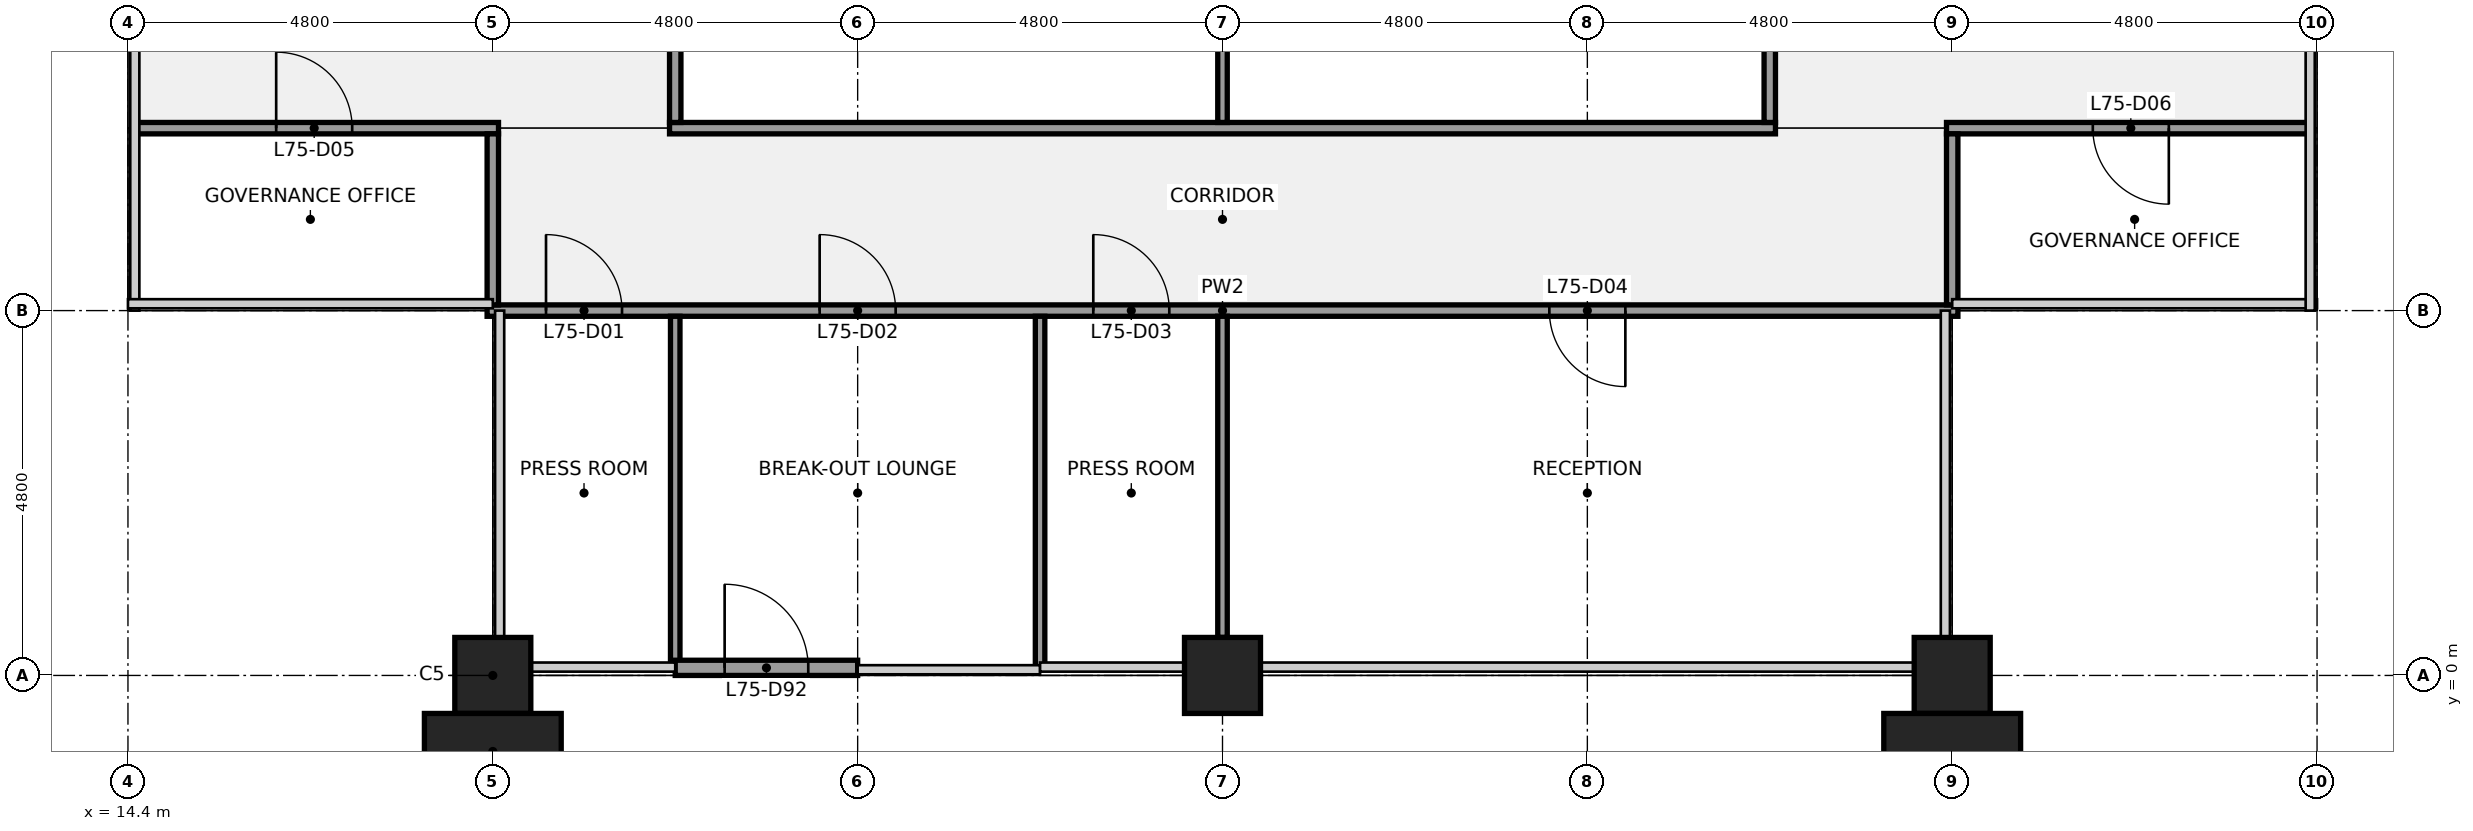
"""IFC4 building model, lengths in metres.
Left out: names, types, materials, properties, quantities, classifications, styles, units other than length and angle.
Written with IfcOpenShell. Run it as: python <this file> out.ifc"""

import sys

from ifc_helpers import new_model, si_unit, direction, frame, frame_2d, origin, origin_2d, place, context, subcontext, project, spatial, rectangle, extrude, element, fill, save


model = new_model("IFC4")
c1 = context("Model", 3, precision=1e-05, world=origin(), true_north=direction((0.0, 1.0)))
c2 = subcontext(c1, "Body", "Model", "MODEL_VIEW")
j1 = project(units=[si_unit("LENGTHUNIT", "METRE"), si_unit("PLANEANGLEUNIT", "RADIAN")], contexts=[c1])
p1 = place(None, origin())
s1 = spatial("IfcSite", under=j1, at=p1, CompositionType="ELEMENT")
p2 = place(p1, origin())
s2 = spatial("IfcBuilding", under=s1, at=p2, CompositionType="ELEMENT")
p3 = place(p2, frame((0.0, 0.0, 338.3)))
s3 = spatial("IfcBuildingStorey", under=s2, at=p3, CompositionType="ELEMENT", Elevation=338.3)
for number, where, z_axis, x_axis in (
    (1, (19.2, 0.0, 0.0), (0.0, 0.0, 1.0), (1.0, 0.0, 0.0)),
    (2, (28.8, 0.0, 0.0), (0.0, 0.0, 1.0), (1.0, 0.0, 0.0)),
    (3, (38.4, 0.0, 0.0), (0.0, 0.0, 1.0), (1.0, 0.0, 0.0)),
):
    element("IfcColumn", number, at=place(p3, frame(where, z_axis=z_axis, x_axis=x_axis)), inside=s3, PredefinedType="COLUMN", context=c2, shape_type="SweptSolid", body=[
        extrude(rectangle(XDim=1.0, YDim=1.0, at=origin_2d()), origin(), (0.0, 0.0, 1.0), 4.0),
    ])
p4 = place(p3, frame((19.125, 4.8, 0.0), z_axis=(0.0, 0.0, 1.0), x_axis=(1.0, 0.0, 0.0)))
e4 = element("IfcWall", 4, at=p4, inside=s3, PredefinedType="PARTITIONING", context=c2, shape_type="SweptSolid", body=[
    extrude(rectangle(XDim=19.35, YDim=0.15, at=frame_2d((9.675, 0.0))), origin(), (0.0, 0.0, 1.0), 2.87),
])
p5 = place(p4, frame((0.775, 0.0, 0.0)))
e5 = element("IfcOpeningElement", 5, at=p5, cuts=e4, PredefinedType="OPENING", context=c2, shape_type="SweptSolid", body=[
    extrude(rectangle(XDim=1.0, YDim=2.1, at=frame_2d((0.5, 1.05))), frame((0.0, 0.085, 0.0), z_axis=(0.0, -1.0, 0.0), x_axis=(1.0, 0.0, 0.0)), (0.0, 0.0, 1.0), 0.17),
])
p6 = place(p4, frame((4.375, 0.0, 0.0)))
e6 = element("IfcOpeningElement", 6, at=p6, cuts=e4, PredefinedType="OPENING", context=c2, shape_type="SweptSolid", body=[
    extrude(rectangle(XDim=1.0, YDim=2.1, at=frame_2d((0.5, 1.05))), frame((0.0, 0.085, 0.0), z_axis=(0.0, -1.0, 0.0), x_axis=(1.0, 0.0, 0.0)), (0.0, 0.0, 1.0), 0.17),
])
p7 = place(p4, frame((7.975, 0.0, 0.0)))
e7 = element("IfcOpeningElement", 7, at=p7, cuts=e4, PredefinedType="OPENING", context=c2, shape_type="SweptSolid", body=[
    extrude(rectangle(XDim=1.0, YDim=2.1, at=frame_2d((0.5, 1.05))), frame((0.0, 0.085, 0.0), z_axis=(0.0, -1.0, 0.0), x_axis=(1.0, 0.0, 0.0)), (0.0, 0.0, 1.0), 0.17),
])
p8 = place(p4, frame((13.975, 0.0, 0.0)))
e8 = element("IfcOpeningElement", 8, at=p8, cuts=e4, PredefinedType="OPENING", context=c2, shape_type="SweptSolid", body=[
    extrude(rectangle(XDim=1.0, YDim=2.1, at=frame_2d((0.5, 1.05))), frame((0.0, 0.085, 0.0), z_axis=(0.0, -1.0, 0.0), x_axis=(1.0, 0.0, 0.0)), (0.0, 0.0, 1.0), 0.17),
])
p9 = place(p3, frame((14.5, 7.2, 0.0), z_axis=(0.0, 0.0, 1.0), x_axis=(1.0, 0.0, 0.0)))
e9 = element("IfcWall", 9, at=p9, inside=s3, PredefinedType="PARTITIONING", context=c2, shape_type="SweptSolid", body=[
    extrude(rectangle(XDim=4.775, YDim=0.15, at=frame_2d((2.387, 0.0))), origin(), (0.0, 0.0, 1.0), 2.87),
])
p10 = place(p9, frame((1.85, 0.0, 0.0)))
e10 = element("IfcOpeningElement", 10, at=p10, cuts=e9, PredefinedType="OPENING", context=c2, shape_type="SweptSolid", body=[
    extrude(rectangle(XDim=1.0, YDim=2.1, at=frame_2d((0.5, 1.05))), frame((0.0, 0.085, 0.0), z_axis=(0.0, -1.0, 0.0), x_axis=(1.0, 0.0, 0.0)), (0.0, 0.0, 1.0), 0.17),
])
p11 = place(p3, frame((21.525, 7.2, 0.0), z_axis=(0.0, 0.0, 1.0), x_axis=(1.0, 0.0, 0.0)))
e11 = element("IfcWall", 11, at=p11, inside=s3, PredefinedType="PARTITIONING", context=c2, shape_type="SweptSolid", body=[
    extrude(rectangle(XDim=14.55, YDim=0.15, at=frame_2d((7.275, 0.0))), origin(), (0.0, 0.0, 1.0), 2.87),
])
p12 = place(p3, frame((38.325, 7.2, 0.0), z_axis=(0.0, 0.0, 1.0), x_axis=(1.0, 0.0, 0.0)))
e12 = element("IfcWall", 12, at=p12, inside=s3, PredefinedType="PARTITIONING", context=c2, shape_type="SweptSolid", body=[
    extrude(rectangle(XDim=4.775, YDim=0.15, at=frame_2d((2.388, 0.0))), origin(), (0.0, 0.0, 1.0), 2.87),
])
p13 = place(p12, frame((1.925, 0.0, 0.0)))
e13 = element("IfcOpeningElement", 13, at=p13, cuts=e12, PredefinedType="OPENING", context=c2, shape_type="SweptSolid", body=[
    extrude(rectangle(XDim=1.0, YDim=2.1, at=frame_2d((0.5, 1.05))), frame((0.0, 0.085, 0.0), z_axis=(0.0, -1.0, 0.0), x_axis=(1.0, 0.0, 0.0)), (0.0, 0.0, 1.0), 0.17),
])
p14 = place(p3, frame((19.2, 4.875, 0.0), z_axis=(0.0, 0.0, 1.0), x_axis=(0.0, 1.0, 0.0)))
e14 = element("IfcWall", 14, at=p14, inside=s3, PredefinedType="PARTITIONING", context=c2, shape_type="SweptSolid", body=[
    extrude(rectangle(XDim=2.25, YDim=0.15, at=frame_2d((1.125, 0.0))), origin(), (0.0, 0.0, 1.0), 2.87),
])
p15 = place(p3, frame((21.6, 0.1, 0.0), z_axis=(0.0, 0.0, 1.0), x_axis=(0.0, 1.0, 0.0)))
e15 = element("IfcWall", 15, at=p15, inside=s3, PredefinedType="PARTITIONING", context=c2, shape_type="SweptSolid", body=[
    extrude(rectangle(XDim=4.625, YDim=0.125, at=frame_2d((2.312, 0.0))), origin(), (0.0, 0.0, 1.0), 2.87),
])
p16 = place(p3, frame((21.6, 7.275, 0.0), z_axis=(0.0, 0.0, 1.0), x_axis=(0.0, 1.0, 0.0)))
e16 = element("IfcWall", 16, at=p16, inside=s3, PredefinedType="PARTITIONING", context=c2, shape_type="SweptSolid", body=[
    extrude(rectangle(XDim=7.062, YDim=0.15, at=frame_2d((3.531, 0.0))), origin(), (0.0, 0.0, 1.0), 2.87),
])
p17 = place(p16, frame((3.031, 0.0, 0.0)))
e17 = element("IfcOpeningElement", 17, at=p17, cuts=e16, PredefinedType="OPENING", context=c2, shape_type="SweptSolid", body=[
    extrude(rectangle(XDim=1.0, YDim=2.1, at=frame_2d((0.5, 1.05))), frame((0.0, 0.085, 0.0), z_axis=(0.0, -1.0, 0.0), x_axis=(1.0, 0.0, 0.0)), (0.0, 0.0, 1.0), 0.17),
])
p18 = place(p3, frame((26.4, 0.1, 0.0), z_axis=(0.0, 0.0, 1.0), x_axis=(0.0, 1.0, 0.0)))
e18 = element("IfcWall", 18, at=p18, inside=s3, PredefinedType="PARTITIONING", context=c2, shape_type="SweptSolid", body=[
    extrude(rectangle(XDim=4.625, YDim=0.125, at=frame_2d((2.312, 0.0))), origin(), (0.0, 0.0, 1.0), 2.87),
])
p19 = place(p3, frame((28.8, 0.5, 0.0), z_axis=(0.0, 0.0, 1.0), x_axis=(0.0, 1.0, 0.0)))
e19 = element("IfcWall", 19, at=p19, inside=s3, PredefinedType="PARTITIONING", context=c2, shape_type="SweptSolid", body=[
    extrude(rectangle(XDim=4.225, YDim=0.125, at=frame_2d((2.113, 0.0))), origin(), (0.0, 0.0, 1.0), 2.87),
])
p20 = place(p3, frame((28.8, 7.275, 0.0), z_axis=(0.0, 0.0, 1.0), x_axis=(0.0, 1.0, 0.0)))
e20 = element("IfcWall", 20, at=p20, inside=s3, PredefinedType="PARTITIONING", context=c2, shape_type="SweptSolid", body=[
    extrude(rectangle(XDim=7.062, YDim=0.125, at=frame_2d((3.531, 0.0))), origin(), (0.0, 0.0, 1.0), 2.87),
])
p21 = place(p3, frame((36.0, 7.275, 0.0), z_axis=(0.0, 0.0, 1.0), x_axis=(0.0, 1.0, 0.0)))
e21 = element("IfcWall", 21, at=p21, inside=s3, PredefinedType="PARTITIONING", context=c2, shape_type="SweptSolid", body=[
    extrude(rectangle(XDim=7.062, YDim=0.15, at=frame_2d((3.531, 0.0))), origin(), (0.0, 0.0, 1.0), 2.87),
])
p22 = place(p21, frame((3.031, 0.0, 0.0)))
e22 = element("IfcOpeningElement", 22, at=p22, cuts=e21, PredefinedType="OPENING", context=c2, shape_type="SweptSolid", body=[
    extrude(rectangle(XDim=1.0, YDim=2.1, at=frame_2d((0.5, 1.05))), frame((0.0, 0.085, 0.0), z_axis=(0.0, -1.0, 0.0), x_axis=(1.0, 0.0, 0.0)), (0.0, 0.0, 1.0), 0.17),
])
p23 = place(p3, frame((38.4, 4.875, 0.0), z_axis=(0.0, 0.0, 1.0), x_axis=(0.0, 1.0, 0.0)))
e23 = element("IfcWall", 23, at=p23, inside=s3, PredefinedType="PARTITIONING", context=c2, shape_type="SweptSolid", body=[
    extrude(rectangle(XDim=2.25, YDim=0.15, at=frame_2d((1.125, 0.0))), origin(), (0.0, 0.0, 1.0), 2.87),
])
p24 = place(p3, frame((21.6, 0.1, 0.0), z_axis=(0.0, 0.0, 1.0), x_axis=(1.0, 0.0, 0.0)))
e24 = element("IfcWall", 24, at=p24, inside=s3, PredefinedType="SOLIDWALL", context=c2, shape_type="SweptSolid", body=[
    extrude(rectangle(XDim=2.4, YDim=0.2, at=frame_2d((1.2, 0.0))), origin(), (0.0, 0.0, 1.0), 3.314),
])
p25 = place(p24, frame((0.65, 0.0, 0.0)))
e25 = element("IfcOpeningElement", 25, at=p25, cuts=e24, PredefinedType="OPENING", context=c2, shape_type="SweptSolid", body=[
    extrude(rectangle(XDim=1.1, YDim=2.1, at=frame_2d((0.55, 1.05))), frame((0.0, 0.11, 0.0), z_axis=(0.0, -1.0, 0.0), x_axis=(1.0, 0.0, 0.0)), (0.0, 0.0, 1.0), 0.22),
])
for number, where, z_axis, x_axis in (
    (26, (19.2, -1.0, 0.0), (0.0, 0.0, 1.0), (1.0, 0.0, 0.0)),
    (27, (38.4, -1.0, 0.0), (0.0, 0.0, 1.0), (1.0, 0.0, 0.0)),
):
    element("IfcColumn", number, at=place(p3, frame(where, z_axis=z_axis, x_axis=x_axis)), inside=s3, PredefinedType="PILASTER", context=c2, shape_type="SweptSolid", body=[
        extrude(rectangle(XDim=1.8, YDim=1.0, at=origin_2d()), origin(), (0.0, 0.0, 1.0), 4.0),
    ])
p26 = place(p5, origin())
e28 = element("IfcDoor", 28, at=p26, inside=s3, OperationType="SINGLE_SWING_LEFT", PredefinedType="DOOR", context=c2, shape_type="SweptSolid", body=[
    extrude(rectangle(XDim=1.0, YDim=2.1, at=frame_2d((0.5, 1.05))), frame((0.0, 0.025, 0.0), z_axis=(0.0, -1.0, 0.0), x_axis=(1.0, 0.0, 0.0)), (0.0, 0.0, 1.0), 0.05),
])
fill(e5, e28)
p27 = place(p6, origin())
e29 = element("IfcDoor", 29, at=p27, inside=s3, OperationType="SINGLE_SWING_LEFT", PredefinedType="DOOR", context=c2, shape_type="SweptSolid", body=[
    extrude(rectangle(XDim=1.0, YDim=2.1, at=frame_2d((0.5, 1.05))), frame((0.0, 0.025, 0.0), z_axis=(0.0, -1.0, 0.0), x_axis=(1.0, 0.0, 0.0)), (0.0, 0.0, 1.0), 0.05),
])
fill(e6, e29)
p28 = place(p7, origin())
e30 = element("IfcDoor", 30, at=p28, inside=s3, OperationType="SINGLE_SWING_LEFT", PredefinedType="DOOR", context=c2, shape_type="SweptSolid", body=[
    extrude(rectangle(XDim=1.0, YDim=2.1, at=frame_2d((0.5, 1.05))), frame((0.0, 0.025, 0.0), z_axis=(0.0, -1.0, 0.0), x_axis=(1.0, 0.0, 0.0)), (0.0, 0.0, 1.0), 0.05),
])
fill(e7, e30)
p29 = place(p8, origin())
e31 = element("IfcDoor", 31, at=p29, inside=s3, OperationType="SINGLE_SWING_RIGHT", PredefinedType="DOOR", context=c2, shape_type="SweptSolid", body=[
    extrude(rectangle(XDim=1.0, YDim=2.1, at=frame_2d((0.5, 1.05))), frame((0.0, 0.025, 0.0), z_axis=(0.0, -1.0, 0.0), x_axis=(1.0, 0.0, 0.0)), (0.0, 0.0, 1.0), 0.05),
])
fill(e8, e31)
p30 = place(p10, origin())
e32 = element("IfcDoor", 32, at=p30, inside=s3, OperationType="SINGLE_SWING_LEFT", PredefinedType="DOOR", context=c2, shape_type="SweptSolid", body=[
    extrude(rectangle(XDim=1.0, YDim=2.1, at=frame_2d((0.5, 1.05))), frame((0.0, 0.025, 0.0), z_axis=(0.0, -1.0, 0.0), x_axis=(1.0, 0.0, 0.0)), (0.0, 0.0, 1.0), 0.05),
])
fill(e10, e32)
p31 = place(p13, origin())
e33 = element("IfcDoor", 33, at=p31, inside=s3, OperationType="SINGLE_SWING_RIGHT", PredefinedType="DOOR", context=c2, shape_type="SweptSolid", body=[
    extrude(rectangle(XDim=1.0, YDim=2.1, at=frame_2d((0.5, 1.05))), frame((0.0, 0.025, 0.0), z_axis=(0.0, -1.0, 0.0), x_axis=(1.0, 0.0, 0.0)), (0.0, 0.0, 1.0), 0.05),
])
fill(e13, e33)
p32 = place(p25, origin())
e34 = element("IfcDoor", 34, at=p32, inside=s3, OperationType="SINGLE_SWING_LEFT", PredefinedType="DOOR", context=c2, shape_type="SweptSolid", body=[
    extrude(rectangle(XDim=1.1, YDim=2.1, at=frame_2d((0.55, 1.05))), frame((0.0, 0.025, 0.0), z_axis=(0.0, -1.0, 0.0), x_axis=(1.0, 0.0, 0.0)), (0.0, 0.0, 1.0), 0.05),
])
fill(e25, e34)
save(model, sys.argv[1])
